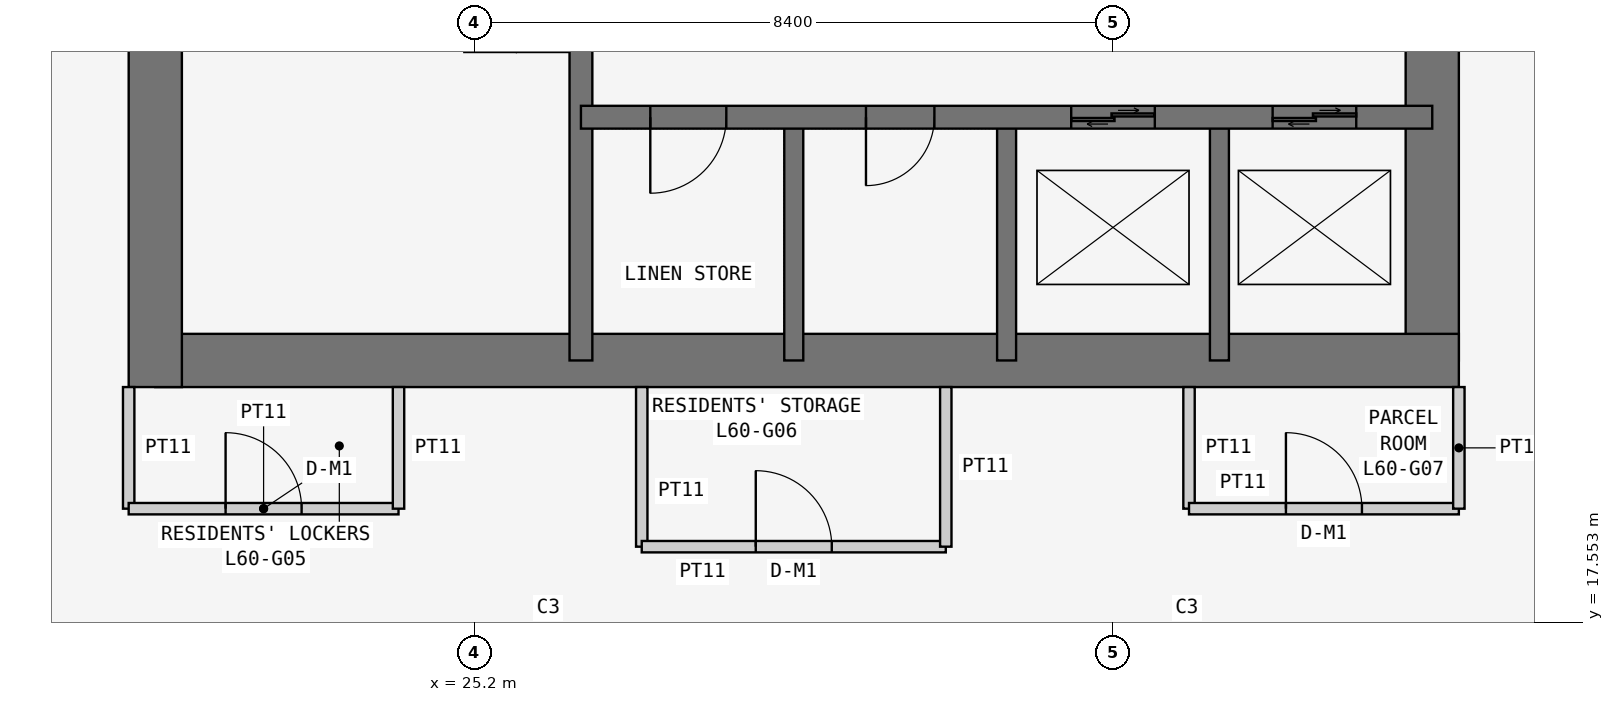
"""IFC4 building model, lengths in metres.
Left out: names, types, materials, properties, quantities, classifications, styles, units other than length and angle.
Written with IfcOpenShell. Run it as: python <this file> out.ifc"""

import sys

from ifc_helpers import new_model, si_unit, direction, frame, frame_2d, origin, place, context, subcontext, project, spatial, rectangle, extrude, element, fill, save


model = new_model("IFC4")
c1 = context("Model", 3, precision=1e-05, world=origin(), true_north=direction((0.0, 1.0)))
c2 = subcontext(c1, "Body", "Model", "MODEL_VIEW")
j1 = project(units=[si_unit("LENGTHUNIT", "METRE"), si_unit("PLANEANGLEUNIT", "RADIAN")], contexts=[c1])
p1 = place(None, origin())
s1 = spatial("IfcSite", under=j1, at=p1, CompositionType="ELEMENT")
p2 = place(p1, origin())
s2 = spatial("IfcBuilding", under=s1, at=p2, CompositionType="ELEMENT")
p3 = place(p2, frame((0.0, 0.0, 230.1)))
s3 = spatial("IfcBuildingStorey", under=s2, at=p3, CompositionType="ELEMENT", Elevation=230.1)
p4 = place(p3, frame((21.0, 21.0, 0.0), z_axis=(0.0, 0.0, 1.0), x_axis=(1.0, 0.0, 0.0)))
e1 = element("IfcWall", 1, at=p4, inside=s3, PredefinedType="SHEAR", context=c2, shape_type="SweptSolid", body=[
    extrude(rectangle(XDim=17.15, YDim=0.7, at=frame_2d((8.575, 0.0))), origin(), (0.0, 0.0, 1.0), 3.6),
])
p5 = place(p3, frame((37.8, 21.0, 0.0), z_axis=(0.0, 0.0, 1.0), x_axis=(0.0, 1.0, 0.0)))
e2 = element("IfcWall", 2, at=p5, inside=s3, PredefinedType="SHEAR", context=c2, shape_type="SweptSolid", body=[
    extrude(rectangle(XDim=17.15, YDim=0.7, at=frame_2d((8.575, 0.0))), origin(), (0.0, 0.0, 1.0), 3.6),
])
p6 = place(p5, frame((5.2, 0.0, 0.0)))
e3 = element("IfcOpeningElement", 3, at=p6, cuts=e2, PredefinedType="OPENING", context=c2, shape_type="SweptSolid", body=[
    extrude(rectangle(XDim=1.2, YDim=2.1, at=frame_2d((0.6, 1.05))), frame((0.0, 0.36, 0.0), z_axis=(0.0, -1.0, 0.0), x_axis=(1.0, 0.0, 0.0)), (0.0, 0.0, 1.0), 0.72),
])
p7 = place(p3, frame((21.0, 37.8, 0.0), z_axis=(0.0, 0.0, 1.0), x_axis=(0.0, -1.0, 0.0)))
e4 = element("IfcWall", 4, at=p7, inside=s3, PredefinedType="SHEAR", context=c2, shape_type="SweptSolid", body=[
    extrude(rectangle(XDim=17.15, YDim=0.7, at=frame_2d((8.575, 0.0))), origin(), (0.0, 0.0, 1.0), 3.6),
])
p8 = place(p7, frame((5.4, 0.0, 0.0)))
e5 = element("IfcOpeningElement", 5, at=p8, cuts=e4, PredefinedType="OPENING", context=c2, shape_type="SweptSolid", body=[
    extrude(rectangle(XDim=1.2, YDim=2.1, at=frame_2d((0.6, 1.05))), frame((0.0, 0.36, 0.0), z_axis=(0.0, -1.0, 0.0), x_axis=(1.0, 0.0, 0.0)), (0.0, 0.0, 1.0), 0.72),
])
p9 = place(p3, frame((26.6, 21.0, 0.0), z_axis=(0.0, 0.0, 1.0), x_axis=(0.0, 1.0, 0.0)))
e6 = element("IfcWall", 6, at=p9, inside=s3, PredefinedType="SHEAR", context=c2, shape_type="SweptSolid", body=[
    extrude(rectangle(XDim=16.8, YDim=0.3, at=frame_2d((8.4, 0.0))), origin(), (0.0, 0.0, 1.0), 3.6),
])
p10 = place(p9, frame((10.4, 0.0, 0.0)))
e7 = element("IfcOpeningElement", 7, at=p10, cuts=e6, PredefinedType="OPENING", context=c2, shape_type="SweptSolid", body=[
    extrude(rectangle(XDim=1.2, YDim=2.1, at=frame_2d((0.6, 1.05))), frame((0.0, 0.16, 0.0), z_axis=(0.0, -1.0, 0.0), x_axis=(1.0, 0.0, 0.0)), (0.0, 0.0, 1.0), 0.32),
])
p11 = place(p3, frame((26.6, 24.2, 0.0), z_axis=(0.0, 0.0, 1.0), x_axis=(1.0, 0.0, 0.0)))
e8 = element("IfcWall", 8, at=p11, inside=s3, PredefinedType="SHEAR", context=c2, shape_type="SweptSolid", body=[
    extrude(rectangle(XDim=11.2, YDim=0.3, at=frame_2d((5.6, 0.0))), origin(), (0.0, 0.0, 1.0), 3.6),
])
p12 = place(p11, frame((0.913, 0.0, 0.0)))
e9 = element("IfcOpeningElement", 9, at=p12, cuts=e8, PredefinedType="OPENING", context=c2, shape_type="SweptSolid", body=[
    extrude(rectangle(XDim=1.0, YDim=2.1, at=frame_2d((0.5, 1.05))), frame((0.0, 0.16, 0.0), z_axis=(0.0, -1.0, 0.0), x_axis=(1.0, 0.0, 0.0)), (0.0, 0.0, 1.0), 0.32),
])
p13 = place(p11, frame((3.75, 0.0, 0.0)))
e10 = element("IfcOpeningElement", 10, at=p13, cuts=e8, PredefinedType="OPENING", context=c2, shape_type="SweptSolid", body=[
    extrude(rectangle(XDim=0.9, YDim=2.1, at=frame_2d((0.45, 1.05))), frame((0.0, 0.16, 0.0), z_axis=(0.0, -1.0, 0.0), x_axis=(1.0, 0.0, 0.0)), (0.0, 0.0, 1.0), 0.32),
])
p14 = place(p11, frame((6.45, 0.0, 0.0)))
e11 = element("IfcOpeningElement", 11, at=p14, cuts=e8, PredefinedType="OPENING", context=c2, shape_type="SweptSolid", body=[
    extrude(rectangle(XDim=1.1, YDim=2.1, at=frame_2d((0.55, 1.05))), frame((0.0, 0.16, 0.0), z_axis=(0.0, -1.0, 0.0), x_axis=(1.0, 0.0, 0.0)), (0.0, 0.0, 1.0), 0.32),
])
p15 = place(p11, frame((9.1, 0.0, 0.0)))
e12 = element("IfcOpeningElement", 12, at=p15, cuts=e8, PredefinedType="OPENING", context=c2, shape_type="SweptSolid", body=[
    extrude(rectangle(XDim=1.1, YDim=2.1, at=frame_2d((0.55, 1.05))), frame((0.0, 0.16, 0.0), z_axis=(0.0, -1.0, 0.0), x_axis=(1.0, 0.0, 0.0)), (0.0, 0.0, 1.0), 0.32),
])
for number, where, z_axis, x_axis in (
    (13, (29.4, 21.0, 0.0), (0.0, 0.0, 1.0), (0.0, 1.0, 0.0)),
    (14, (32.2, 21.0, 0.0), (0.0, 0.0, 1.0), (0.0, 1.0, 0.0)),
    (15, (35.0, 21.0, 0.0), (0.0, 0.0, 1.0), (0.0, 1.0, 0.0)),
):
    element("IfcWall", number, at=place(p3, frame(where, z_axis=z_axis, x_axis=x_axis)), inside=s3, PredefinedType="SHEAR", context=c2, shape_type="SweptSolid", body=[
        extrude(rectangle(XDim=3.2, YDim=0.25, at=frame_2d((1.6, 0.0))), origin(), (0.0, 0.0, 1.0), 3.6),
    ])
p16 = place(p3, frame((20.65, 20.65, 0.0), z_axis=(0.0, 0.0, 1.0), x_axis=(0.0, -1.0, 0.0)))
e16 = element("IfcWall", 16, at=p16, inside=s3, PredefinedType="PARTITIONING", context=c2, shape_type="SweptSolid", body=[
    extrude(rectangle(XDim=1.6, YDim=0.15, at=frame_2d((0.8, 0.0))), origin(), (0.0, 0.0, 1.0), 3.45),
])
p17 = place(p3, frame((20.65, 19.05, 0.0), z_axis=(0.0, 0.0, 1.0), x_axis=(1.0, 0.0, 0.0)))
e17 = element("IfcWall", 17, at=p17, inside=s3, PredefinedType="PARTITIONING", context=c2, shape_type="SweptSolid", body=[
    extrude(rectangle(XDim=3.55, YDim=0.15, at=frame_2d((1.775, 0.0))), origin(), (0.0, 0.0, 1.0), 3.45),
])
p18 = place(p17, frame((1.275, 0.0, 0.0)))
e18 = element("IfcOpeningElement", 18, at=p18, cuts=e17, PredefinedType="OPENING", context=c2, shape_type="SweptSolid", body=[
    extrude(rectangle(XDim=1.0, YDim=2.1, at=frame_2d((0.5, 1.05))), frame((0.0, 0.085, 0.0), z_axis=(0.0, -1.0, 0.0), x_axis=(1.0, 0.0, 0.0)), (0.0, 0.0, 1.0), 0.17),
])
p19 = place(p3, frame((24.2, 19.05, 0.0), z_axis=(0.0, 0.0, 1.0), x_axis=(0.0, 1.0, 0.0)))
e19 = element("IfcWall", 19, at=p19, inside=s3, PredefinedType="PARTITIONING", context=c2, shape_type="SweptSolid", body=[
    extrude(rectangle(XDim=1.6, YDim=0.15, at=frame_2d((0.8, 0.0))), origin(), (0.0, 0.0, 1.0), 3.45),
])
p20 = place(p3, frame((27.4, 20.65, 0.0), z_axis=(0.0, 0.0, 1.0), x_axis=(0.0, -1.0, 0.0)))
e20 = element("IfcWall", 20, at=p20, inside=s3, PredefinedType="PARTITIONING", context=c2, shape_type="SweptSolid", body=[
    extrude(rectangle(XDim=2.1, YDim=0.15, at=frame_2d((1.05, 0.0))), origin(), (0.0, 0.0, 1.0), 3.45),
])
p21 = place(p3, frame((27.4, 18.55, 0.0), z_axis=(0.0, 0.0, 1.0), x_axis=(1.0, 0.0, 0.0)))
e21 = element("IfcWall", 21, at=p21, inside=s3, PredefinedType="PARTITIONING", context=c2, shape_type="SweptSolid", body=[
    extrude(rectangle(XDim=4.0, YDim=0.15, at=frame_2d((2.0, 0.0))), origin(), (0.0, 0.0, 1.0), 3.45),
])
p22 = place(p21, frame((1.5, 0.0, 0.0)))
e22 = element("IfcOpeningElement", 22, at=p22, cuts=e21, PredefinedType="OPENING", context=c2, shape_type="SweptSolid", body=[
    extrude(rectangle(XDim=1.0, YDim=2.1, at=frame_2d((0.5, 1.05))), frame((0.0, 0.085, 0.0), z_axis=(0.0, -1.0, 0.0), x_axis=(1.0, 0.0, 0.0)), (0.0, 0.0, 1.0), 0.17),
])
p23 = place(p3, frame((31.4, 18.55, 0.0), z_axis=(0.0, 0.0, 1.0), x_axis=(0.0, 1.0, 0.0)))
e23 = element("IfcWall", 23, at=p23, inside=s3, PredefinedType="PARTITIONING", context=c2, shape_type="SweptSolid", body=[
    extrude(rectangle(XDim=2.1, YDim=0.15, at=frame_2d((1.05, 0.0))), origin(), (0.0, 0.0, 1.0), 3.45),
])
p24 = place(p3, frame((34.6, 20.65, 0.0), z_axis=(0.0, 0.0, 1.0), x_axis=(0.0, -1.0, 0.0)))
e24 = element("IfcWall", 24, at=p24, inside=s3, PredefinedType="PARTITIONING", context=c2, shape_type="SweptSolid", body=[
    extrude(rectangle(XDim=1.6, YDim=0.15, at=frame_2d((0.8, 0.0))), origin(), (0.0, 0.0, 1.0), 3.45),
])
p25 = place(p3, frame((34.6, 19.05, 0.0), z_axis=(0.0, 0.0, 1.0), x_axis=(1.0, 0.0, 0.0)))
e25 = element("IfcWall", 25, at=p25, inside=s3, PredefinedType="PARTITIONING", context=c2, shape_type="SweptSolid", body=[
    extrude(rectangle(XDim=3.55, YDim=0.15, at=frame_2d((1.775, 0.0))), origin(), (0.0, 0.0, 1.0), 3.45),
])
p26 = place(p25, frame((1.275, 0.0, 0.0)))
e26 = element("IfcOpeningElement", 26, at=p26, cuts=e25, PredefinedType="OPENING", context=c2, shape_type="SweptSolid", body=[
    extrude(rectangle(XDim=1.0, YDim=2.1, at=frame_2d((0.5, 1.05))), frame((0.0, 0.085, 0.0), z_axis=(0.0, -1.0, 0.0), x_axis=(1.0, 0.0, 0.0)), (0.0, 0.0, 1.0), 0.17),
])
p27 = place(p3, frame((38.15, 19.05, 0.0), z_axis=(0.0, 0.0, 1.0), x_axis=(0.0, 1.0, 0.0)))
e27 = element("IfcWall", 27, at=p27, inside=s3, PredefinedType="PARTITIONING", context=c2, shape_type="SweptSolid", body=[
    extrude(rectangle(XDim=1.6, YDim=0.15, at=frame_2d((0.8, 0.0))), origin(), (0.0, 0.0, 1.0), 3.45),
])
p28 = place(p18, origin())
e28 = element("IfcDoor", 28, at=p28, inside=s3, OperationType="SINGLE_SWING_LEFT", PredefinedType="DOOR", context=c2, shape_type="SweptSolid", body=[
    extrude(rectangle(XDim=1.0, YDim=2.1, at=frame_2d((0.5, 1.05))), frame((0.0, 0.025, 0.0), z_axis=(0.0, -1.0, 0.0), x_axis=(1.0, 0.0, 0.0)), (0.0, 0.0, 1.0), 0.05),
])
fill(e18, e28)
p29 = place(p22, origin())
e29 = element("IfcDoor", 29, at=p29, inside=s3, OperationType="SINGLE_SWING_LEFT", PredefinedType="DOOR", context=c2, shape_type="SweptSolid", body=[
    extrude(rectangle(XDim=1.0, YDim=2.1, at=frame_2d((0.5, 1.05))), frame((0.0, 0.025, 0.0), z_axis=(0.0, -1.0, 0.0), x_axis=(1.0, 0.0, 0.0)), (0.0, 0.0, 1.0), 0.05),
])
fill(e22, e29)
p30 = place(p26, origin())
e30 = element("IfcDoor", 30, at=p30, inside=s3, OperationType="SINGLE_SWING_LEFT", PredefinedType="DOOR", context=c2, shape_type="SweptSolid", body=[
    extrude(rectangle(XDim=1.0, YDim=2.1, at=frame_2d((0.5, 1.05))), frame((0.0, 0.025, 0.0), z_axis=(0.0, -1.0, 0.0), x_axis=(1.0, 0.0, 0.0)), (0.0, 0.0, 1.0), 0.05),
])
fill(e26, e30)
p31 = place(p12, frame((1.0, 0.0, 0.0), z_axis=(0.0, 0.0, 1.0), x_axis=(-1.0, 0.0, 0.0)))
e31 = element("IfcDoor", 31, at=p31, inside=s3, OperationType="SINGLE_SWING_RIGHT", PredefinedType="DOOR", context=c2, shape_type="SweptSolid", body=[
    extrude(rectangle(XDim=1.0, YDim=2.1, at=frame_2d((0.5, 1.05))), frame((0.0, 0.025, 0.0), z_axis=(0.0, -1.0, 0.0), x_axis=(1.0, 0.0, 0.0)), (0.0, 0.0, 1.0), 0.05),
])
fill(e9, e31)
p32 = place(p13, frame((0.9, 0.0, 0.0), z_axis=(0.0, 0.0, 1.0), x_axis=(-1.0, 0.0, 0.0)))
e32 = element("IfcDoor", 32, at=p32, inside=s3, OperationType="SINGLE_SWING_RIGHT", PredefinedType="DOOR", context=c2, shape_type="SweptSolid", body=[
    extrude(rectangle(XDim=0.9, YDim=2.1, at=frame_2d((0.45, 1.05))), frame((0.0, 0.025, 0.0), z_axis=(0.0, -1.0, 0.0), x_axis=(1.0, 0.0, 0.0)), (0.0, 0.0, 1.0), 0.05),
])
fill(e10, e32)
p33 = place(p14, origin())
e33 = element("IfcDoor", 33, at=p33, inside=s3, OperationType="DOUBLE_DOOR_SLIDING", PredefinedType="DOOR", context=c2, shape_type="SweptSolid", body=[
    extrude(rectangle(XDim=1.1, YDim=2.1, at=frame_2d((0.55, 1.05))), frame((0.0, 0.025, 0.0), z_axis=(0.0, -1.0, 0.0), x_axis=(1.0, 0.0, 0.0)), (0.0, 0.0, 1.0), 0.05),
])
fill(e11, e33)
p34 = place(p15, origin())
e34 = element("IfcDoor", 34, at=p34, inside=s3, OperationType="DOUBLE_DOOR_SLIDING", PredefinedType="DOOR", context=c2, shape_type="SweptSolid", body=[
    extrude(rectangle(XDim=1.1, YDim=2.1, at=frame_2d((0.55, 1.05))), frame((0.0, 0.025, 0.0), z_axis=(0.0, -1.0, 0.0), x_axis=(1.0, 0.0, 0.0)), (0.0, 0.0, 1.0), 0.05),
])
fill(e12, e34)
save(model, sys.argv[1])
